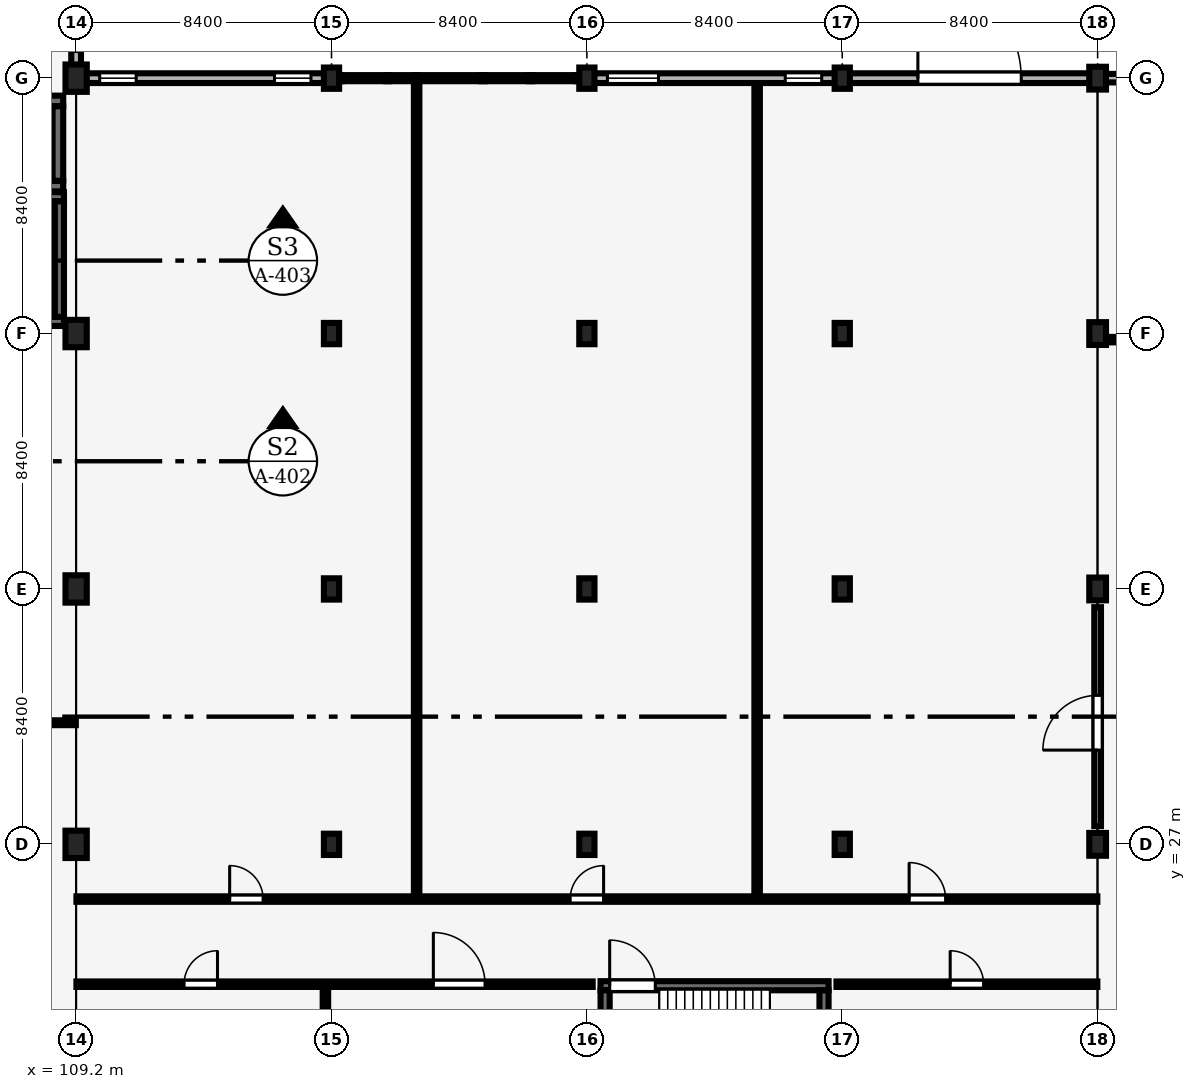
"""IFC4 building model, lengths in metres.
Left out: names, types, materials, properties, quantities, classifications, styles, units other than length and angle.
Written with IfcOpenShell. Run it as: python <this file> out.ifc"""

import sys

from ifc_helpers import new_model, si_unit, direction, frame, frame_2d, origin, origin_2d, place, context, subcontext, project, spatial, rectangle, extrude, element, fill, save


model = new_model("IFC4")
c1 = context("Model", 3, precision=1e-05, world=origin(), true_north=direction((0.0, 1.0)))
c2 = subcontext(c1, "Body", "Model", "MODEL_VIEW")
j1 = project(units=[si_unit("LENGTHUNIT", "METRE"), si_unit("PLANEANGLEUNIT", "RADIAN")], contexts=[c1])
p1 = place(None, origin())
s1 = spatial("IfcSite", under=j1, at=p1, CompositionType="ELEMENT")
p2 = place(p1, origin())
s2 = spatial("IfcBuilding", under=s1, at=p2, CompositionType="ELEMENT")
p3 = place(p2, origin())
s3 = spatial("IfcBuildingStorey", under=s2, at=p3, CompositionType="ELEMENT", Elevation=0.0)
for number, where, z_axis, x_axis in (
    (1, (109.2, 27.0, 0.0), (0.0, 0.0, 1.0), (1.0, 0.0, 0.0)),
    (2, (109.2, 35.4, 0.0), (0.0, 0.0, 1.0), (1.0, 0.0, 0.0)),
    (3, (109.2, 43.8, 0.0), (0.0, 0.0, 1.0), (1.0, 0.0, 0.0)),
    (4, (109.2, 52.2, 0.0), (0.0, 0.0, 1.0), (1.0, 0.0, 0.0)),
):
    element("IfcColumn", number, at=place(p3, frame(where, z_axis=z_axis, x_axis=x_axis)), inside=s3, PredefinedType="COLUMN", context=c2, shape_type="SweptSolid", body=[
        extrude(rectangle(XDim=0.7, YDim=0.9, at=origin_2d()), origin(), (0.0, 0.0, 1.0), 4.8),
    ])
for number, where, z_axis, x_axis in (
    (5, (117.6, 27.0, 0.0), (0.0, 0.0, 1.0), (1.0, 0.0, 0.0)),
    (6, (117.6, 35.4, 0.0), (0.0, 0.0, 1.0), (1.0, 0.0, 0.0)),
    (7, (117.6, 43.8, 0.0), (0.0, 0.0, 1.0), (1.0, 0.0, 0.0)),
    (8, (117.6, 52.2, 0.0), (0.0, 0.0, 1.0), (1.0, 0.0, 0.0)),
    (9, (126.0, 27.0, 0.0), (0.0, 0.0, 1.0), (1.0, 0.0, 0.0)),
    (10, (126.0, 35.4, 0.0), (0.0, 0.0, 1.0), (1.0, 0.0, 0.0)),
    (11, (126.0, 43.8, 0.0), (0.0, 0.0, 1.0), (1.0, 0.0, 0.0)),
    (12, (126.0, 52.2, 0.0), (0.0, 0.0, 1.0), (1.0, 0.0, 0.0)),
    (13, (134.4, 27.0, 0.0), (0.0, 0.0, 1.0), (1.0, 0.0, 0.0)),
    (14, (134.4, 35.4, 0.0), (0.0, 0.0, 1.0), (1.0, 0.0, 0.0)),
    (15, (134.4, 43.8, 0.0), (0.0, 0.0, 1.0), (1.0, 0.0, 0.0)),
    (16, (134.4, 52.2, 0.0), (0.0, 0.0, 1.0), (1.0, 0.0, 0.0)),
):
    element("IfcColumn", number, at=place(p3, frame(where, z_axis=z_axis, x_axis=x_axis)), inside=s3, PredefinedType="COLUMN", context=c2, shape_type="SweptSolid", body=[
        extrude(rectangle(XDim=0.5, YDim=0.7, at=origin_2d()), origin(), (0.0, 0.0, 1.0), 4.8),
    ])
for number, where, z_axis, x_axis in (
    (17, (142.8, 27.0, 0.0), (0.0, 0.0, 1.0), (1.0, 0.0, 0.0)),
    (18, (142.8, 35.4, 0.0), (0.0, 0.0, 1.0), (1.0, 0.0, 0.0)),
    (19, (142.8, 43.8, 0.0), (0.0, 0.0, 1.0), (1.0, 0.0, 0.0)),
    (20, (142.8, 52.2, 0.0), (0.0, 0.0, 1.0), (1.0, 0.0, 0.0)),
):
    element("IfcColumn", number, at=place(p3, frame(where, z_axis=z_axis, x_axis=x_axis)), inside=s3, PredefinedType="COLUMN", context=c2, shape_type="SweptSolid", body=[
        extrude(rectangle(XDim=0.55, YDim=0.75, at=origin_2d()), origin(), (0.0, 0.0, 1.0), 4.8),
    ])
p4 = place(p3, frame((143.05, 52.2, 0.0), z_axis=(0.0, 0.0, 1.0), x_axis=(1.0, 0.0, 0.0)))
e21 = element("IfcWall", 21, at=p4, inside=s3, PredefinedType="SOLIDWALL", context=c2, shape_type="SweptSolid", body=[
    extrude(rectangle(XDim=7.9, YDim=0.28, at=frame_2d((3.95, 0.0))), origin(), (0.0, 0.0, 1.0), 4.267),
])
p5 = place(p3, frame((109.525, 52.2, 0.0), z_axis=(0.0, 0.0, 1.0), x_axis=(1.0, 0.0, 0.0)))
e22 = element("IfcWall", 22, at=p5, inside=s3, PredefinedType="SOLIDWALL", context=c2, shape_type="SweptSolid", body=[
    extrude(rectangle(XDim=7.85, YDim=0.32, at=frame_2d((3.925, 0.0))), origin(), (0.0, 0.0, 1.0), 4.03),
])
p6 = place(p5, frame((0.45, 0.0, 0.9)))
e23 = element("IfcOpeningElement", 23, at=p6, cuts=e22, PredefinedType="OPENING", context=c2, shape_type="SweptSolid", body=[
    extrude(rectangle(XDim=1.2, YDim=1.5, at=frame_2d((0.6, 0.75))), frame((0.0, 0.17, 0.0), z_axis=(0.0, -1.0, 0.0), x_axis=(1.0, 0.0, 0.0)), (0.0, 0.0, 1.0), 0.34),
])
p7 = place(p5, frame((6.2, 0.0, 0.9)))
e24 = element("IfcOpeningElement", 24, at=p7, cuts=e22, PredefinedType="OPENING", context=c2, shape_type="SweptSolid", body=[
    extrude(rectangle(XDim=1.2, YDim=1.8, at=frame_2d((0.6, 0.9))), frame((0.0, 0.17, 0.0), z_axis=(0.0, -1.0, 0.0), x_axis=(1.0, 0.0, 0.0)), (0.0, 0.0, 1.0), 0.34),
])
p8 = place(p3, frame((126.225, 52.2, 0.0), z_axis=(0.0, 0.0, 1.0), x_axis=(1.0, 0.0, 0.0)))
e25 = element("IfcWall", 25, at=p8, inside=s3, PredefinedType="SOLIDWALL", context=c2, shape_type="SweptSolid", body=[
    extrude(rectangle(XDim=7.95, YDim=0.32, at=frame_2d((3.975, 0.0))), origin(), (0.0, 0.0, 1.0), 4.03),
])
p9 = place(p8, frame((0.45, 0.0, 0.9)))
e26 = element("IfcOpeningElement", 26, at=p9, cuts=e25, PredefinedType="OPENING", context=c2, shape_type="SweptSolid", body=[
    extrude(rectangle(XDim=1.68, YDim=2.4, at=frame_2d((0.84, 1.2))), frame((0.0, 0.17, 0.0), z_axis=(0.0, -1.0, 0.0), x_axis=(1.0, 0.0, 0.0)), (0.0, 0.0, 1.0), 0.34),
])
p10 = place(p8, frame((6.3, 0.0, 0.9)))
e27 = element("IfcOpeningElement", 27, at=p10, cuts=e25, PredefinedType="OPENING", context=c2, shape_type="SweptSolid", body=[
    extrude(rectangle(XDim=1.2, YDim=1.5, at=frame_2d((0.6, 0.75))), frame((0.0, 0.17, 0.0), z_axis=(0.0, -1.0, 0.0), x_axis=(1.0, 0.0, 0.0)), (0.0, 0.0, 1.0), 0.34),
])
p11 = place(p3, frame((134.625, 52.2, 0.0), z_axis=(0.0, 0.0, 1.0), x_axis=(1.0, 0.0, 0.0)))
e28 = element("IfcWall", 28, at=p11, inside=s3, PredefinedType="SOLIDWALL", context=c2, shape_type="SweptSolid", body=[
    extrude(rectangle(XDim=7.925, YDim=0.32, at=frame_2d((3.962, 0.0))), origin(), (0.0, 0.0, 1.0), 4.08),
])
p12 = place(p11, frame((2.262, 0.0, 0.0)))
e29 = element("IfcOpeningElement", 29, at=p12, cuts=e28, PredefinedType="OPENING", context=c2, shape_type="SweptSolid", body=[
    extrude(rectangle(XDim=3.4, YDim=3.2, at=frame_2d((1.7, 1.6))), frame((0.0, 0.17, 0.0), z_axis=(0.0, -1.0, 0.0), x_axis=(1.0, 0.0, 0.0)), (0.0, 0.0, 1.0), 0.34),
])
p13 = place(p3, frame((109.2, 52.625, 0.0), z_axis=(0.0, 0.0, 1.0), x_axis=(0.0, 1.0, 0.0)))
e30 = element("IfcWall", 30, at=p13, inside=s3, PredefinedType="SOLIDWALL", context=c2, shape_type="SweptSolid", body=[
    extrude(rectangle(XDim=7.55, YDim=0.32, at=frame_2d((3.775, 0.0))), origin(), (0.0, 0.0, 1.0), 3.89),
])
p14 = place(p13, frame((4.6, 0.0, 0.0), z_axis=(0.0, 0.0, 1.0), x_axis=(-1.0, 0.0, 0.0)))
e31 = element("IfcOpeningElement", 31, at=p14, cuts=e30, PredefinedType="OPENING", context=c2, shape_type="SweptSolid", body=[
    extrude(rectangle(XDim=1.65, YDim=2.25, at=frame_2d((0.825, 1.125))), frame((0.0, 0.17, 0.0), z_axis=(0.0, -1.0, 0.0), x_axis=(1.0, 0.0, 0.0)), (0.0, 0.0, 1.0), 0.34),
])
p15 = place(p13, frame((0.45, 0.0, 0.95)))
e32 = element("IfcOpeningElement", 32, at=p15, cuts=e30, PredefinedType="OPENING", context=c2, shape_type="SweptSolid", body=[
    extrude(rectangle(XDim=1.68, YDim=2.1, at=frame_2d((0.84, 1.05))), frame((0.0, 0.17, 0.0), z_axis=(0.0, -1.0, 0.0), x_axis=(1.0, 0.0, 0.0)), (0.0, 0.0, 1.0), 0.34),
])
for number, where, z_axis, x_axis in (
    (33, (101.2, 44.2, 0.0), (0.0, 0.0, 1.0), (1.0, 0.0, 0.0)),
    (34, (101.2, 48.3, 0.0), (0.0, 0.0, 1.0), (1.0, 0.0, 0.0)),
):
    element("IfcWall", number, at=place(p3, frame(where, z_axis=z_axis, x_axis=x_axis)), inside=s3, PredefinedType="SHEAR", context=c2, shape_type="SweptSolid", body=[
        extrude(rectangle(XDim=7.6, YDim=0.3, at=frame_2d((3.8, 0.0))), origin(), (0.0, 0.0, 1.0), 4.625),
    ])
p16 = place(p3, frame((108.65, 44.35, 0.0), z_axis=(0.0, 0.0, 1.0), x_axis=(0.0, 1.0, 0.0)))
e35 = element("IfcWall", 35, at=p16, inside=s3, PredefinedType="SHEAR", context=c2, shape_type="SweptSolid", body=[
    extrude(rectangle(XDim=3.8, YDim=0.3, at=frame_2d((1.9, 0.0))), origin(), (0.0, 0.0, 1.0), 4.625),
])
for number, where, z_axis, x_axis in (
    (36, (105.225, 48.65, 0.0), (0.0, 0.0, 1.0), (1.0, 0.0, 0.0)),
    (37, (105.225, 51.45, 0.0), (0.0, 0.0, 1.0), (1.0, 0.0, 0.0)),
):
    element("IfcWall", number, at=place(p3, frame(where, z_axis=z_axis, x_axis=x_axis)), inside=s3, PredefinedType="SHEAR", context=c2, shape_type="SweptSolid", body=[
        extrude(rectangle(XDim=3.55, YDim=0.35, at=frame_2d((1.775, 0.0))), origin(), (0.0, 0.0, 1.0), 4.52),
    ])
p17 = place(p3, frame((108.6, 48.825, 0.0), z_axis=(0.0, 0.0, 1.0), x_axis=(0.0, 1.0, 0.0)))
e38 = element("IfcWall", 38, at=p17, inside=s3, PredefinedType="SHEAR", context=c2, shape_type="SweptSolid", body=[
    extrude(rectangle(XDim=2.45, YDim=0.35, at=frame_2d((1.225, 0.0))), origin(), (0.0, 0.0, 1.0), 4.52),
])
p18 = place(p3, frame((126.45, 22.35, 0.0), z_axis=(0.0, 0.0, 1.0), x_axis=(1.0, 0.0, 0.0)))
e39 = element("IfcWall", 39, at=p18, inside=s3, PredefinedType="SHEAR", context=c2, shape_type="SweptSolid", body=[
    extrude(rectangle(XDim=7.5, YDim=0.3, at=frame_2d((3.75, 0.0))), origin(), (0.0, 0.0, 1.0), 4.625),
])
p19 = place(p18, frame((0.3, 0.0, 0.0)))
e40 = element("IfcOpeningElement", 40, at=p19, cuts=e39, PredefinedType="OPENING", context=c2, shape_type="SweptSolid", body=[
    extrude(rectangle(XDim=1.5, YDim=2.2, at=frame_2d((0.75, 1.1))), frame((0.0, 0.16, 0.0), z_axis=(0.0, -1.0, 0.0), x_axis=(1.0, 0.0, 0.0)), (0.0, 0.0, 1.0), 0.32),
])
for number, where, z_axis, x_axis in (
    (41, (126.6, 18.3, 0.0), (0.0, 0.0, 1.0), (0.0, 1.0, 0.0)),
    (42, (133.8, 18.3, 0.0), (0.0, 0.0, 1.0), (0.0, 1.0, 0.0)),
):
    element("IfcWall", number, at=place(p3, frame(where, z_axis=z_axis, x_axis=x_axis)), inside=s3, PredefinedType="SHEAR", context=c2, shape_type="SweptSolid", body=[
        extrude(rectangle(XDim=3.9, YDim=0.3, at=frame_2d((1.95, 0.0))), origin(), (0.0, 0.0, 1.0), 4.625),
    ])
p20 = place(p3, frame((101.105, 31.0, 0.0), z_axis=(0.0, 0.0, 1.0), x_axis=(1.0, 0.0, 0.0)))
e43 = element("IfcWall", 43, at=p20, inside=s3, PredefinedType="PARTITIONING", context=c2, shape_type="SweptSolid", body=[
    extrude(rectangle(XDim=8.085, YDim=0.16, at=frame_2d((4.042, 0.0))), origin(), (0.0, 0.0, 1.0), 4.5),
])
p21 = place(p3, frame((120.4, 25.295, 0.0), z_axis=(0.0, 0.0, 1.0), x_axis=(0.0, 1.0, 0.0)))
e44 = element("IfcWall", 44, at=p21, inside=s3, PredefinedType="PARTITIONING", context=c2, shape_type="SweptSolid", body=[
    extrude(rectangle(XDim=26.8, YDim=0.18, at=frame_2d((13.4, 0.0))), origin(), (0.0, 0.0, 1.0), 4.5),
])
p22 = place(p3, frame((131.6, 25.295, 0.0), z_axis=(0.0, 0.0, 1.0), x_axis=(0.0, 1.0, 0.0)))
e45 = element("IfcWall", 45, at=p22, inside=s3, PredefinedType="PARTITIONING", context=c2, shape_type="SweptSolid", body=[
    extrude(rectangle(XDim=26.74, YDim=0.18, at=frame_2d((13.37, 0.0))), origin(), (0.0, 0.0, 1.0), 4.5),
])
p23 = place(p3, frame((109.21, 25.2, 0.0), z_axis=(0.0, 0.0, 1.0), x_axis=(1.0, 0.0, 0.0)))
e46 = element("IfcWall", 46, at=p23, inside=s3, PredefinedType="PARTITIONING", context=c2, shape_type="SweptSolid", body=[
    extrude(rectangle(XDim=33.58, YDim=0.18, at=frame_2d((16.79, 0.0))), origin(), (0.0, 0.0, 1.0), 4.5),
])
p24 = place(p23, frame((5.04, 0.0, 0.0)))
e47 = element("IfcOpeningElement", 47, at=p24, cuts=e46, PredefinedType="OPENING", context=c2, shape_type="SweptSolid", body=[
    extrude(rectangle(XDim=1.1, YDim=2.3, at=frame_2d((0.55, 1.15))), frame((0.0, 0.1, 0.0), z_axis=(0.0, -1.0, 0.0), x_axis=(1.0, 0.0, 0.0)), (0.0, 0.0, 1.0), 0.2),
])
p25 = place(p23, frame((16.24, 0.0, 0.0)))
e48 = element("IfcOpeningElement", 48, at=p25, cuts=e46, PredefinedType="OPENING", context=c2, shape_type="SweptSolid", body=[
    extrude(rectangle(XDim=1.1, YDim=2.3, at=frame_2d((0.55, 1.15))), frame((0.0, 0.1, 0.0), z_axis=(0.0, -1.0, 0.0), x_axis=(1.0, 0.0, 0.0)), (0.0, 0.0, 1.0), 0.2),
])
p26 = place(p23, frame((27.39, 0.0, 0.0)))
e49 = element("IfcOpeningElement", 49, at=p26, cuts=e46, PredefinedType="OPENING", context=c2, shape_type="SweptSolid", body=[
    extrude(rectangle(XDim=1.2, YDim=2.4, at=frame_2d((0.6, 1.2))), frame((0.0, 0.1, 0.0), z_axis=(0.0, -1.0, 0.0), x_axis=(1.0, 0.0, 0.0)), (0.0, 0.0, 1.0), 0.2),
])
p27 = place(p3, frame((117.4, 18.105, 0.0), z_axis=(0.0, 0.0, 1.0), x_axis=(0.0, 1.0, 0.0)))
e50 = element("IfcWall", 50, at=p27, inside=s3, PredefinedType="PARTITIONING", context=c2, shape_type="SweptSolid", body=[
    extrude(rectangle(XDim=4.2, YDim=0.18, at=frame_2d((2.1, 0.0))), origin(), (0.0, 0.0, 1.0), 3.72),
])
p28 = place(p3, frame((109.21, 22.4, 0.0), z_axis=(0.0, 0.0, 1.0), x_axis=(1.0, 0.0, 0.0)))
e51 = element("IfcWall", 51, at=p28, inside=s3, PredefinedType="PARTITIONING", context=c2, shape_type="SweptSolid", body=[
    extrude(rectangle(XDim=16.98, YDim=0.18, at=frame_2d((8.49, 0.0))), origin(), (0.0, 0.0, 1.0), 4.5),
])
p29 = place(p28, frame((3.54, 0.0, 0.0)))
e52 = element("IfcOpeningElement", 52, at=p29, cuts=e51, PredefinedType="OPENING", context=c2, shape_type="SweptSolid", body=[
    extrude(rectangle(XDim=1.1, YDim=2.3, at=frame_2d((0.55, 1.15))), frame((0.0, 0.1, 0.0), z_axis=(0.0, -1.0, 0.0), x_axis=(1.0, 0.0, 0.0)), (0.0, 0.0, 1.0), 0.2),
])
p30 = place(p28, frame((11.74, 0.0, 0.0)))
e53 = element("IfcOpeningElement", 53, at=p30, cuts=e51, PredefinedType="OPENING", context=c2, shape_type="SweptSolid", body=[
    extrude(rectangle(XDim=1.7, YDim=2.25, at=frame_2d((0.85, 1.125))), frame((0.0, 0.1, 0.0), z_axis=(0.0, -1.0, 0.0), x_axis=(1.0, 0.0, 0.0)), (0.0, 0.0, 1.0), 0.2),
])
p31 = place(p3, frame((134.21, 22.4, 0.0), z_axis=(0.0, 0.0, 1.0), x_axis=(1.0, 0.0, 0.0)))
e54 = element("IfcWall", 54, at=p31, inside=s3, PredefinedType="PARTITIONING", context=c2, shape_type="SweptSolid", body=[
    extrude(rectangle(XDim=8.58, YDim=0.18, at=frame_2d((4.29, 0.0))), origin(), (0.0, 0.0, 1.0), 4.5),
])
p32 = place(p31, frame((3.74, 0.0, 0.0)))
e55 = element("IfcOpeningElement", 55, at=p32, cuts=e54, PredefinedType="OPENING", context=c2, shape_type="SweptSolid", body=[
    extrude(rectangle(XDim=1.1, YDim=2.3, at=frame_2d((0.55, 1.15))), frame((0.0, 0.1, 0.0), z_axis=(0.0, -1.0, 0.0), x_axis=(1.0, 0.0, 0.0)), (0.0, 0.0, 1.0), 0.2),
])
p33 = place(p3, frame((143.085, 43.6, 0.0), z_axis=(0.0, 0.0, 1.0), x_axis=(1.0, 0.0, 0.0)))
e56 = element("IfcWall", 56, at=p33, inside=s3, PredefinedType="PARTITIONING", context=c2, shape_type="SweptSolid", body=[
    extrude(rectangle(XDim=24.77, YDim=0.18, at=frame_2d((12.385, 0.0))), origin(), (0.0, 0.0, 1.0), 4.5),
])
p34 = place(p33, frame((9.915, 0.0, 0.0)))
e57 = element("IfcOpeningElement", 57, at=p34, cuts=e56, PredefinedType="OPENING", context=c2, shape_type="SweptSolid", body=[
    extrude(rectangle(XDim=1.8, YDim=2.4, at=frame_2d((0.9, 1.2))), frame((0.0, 0.1, 0.0), z_axis=(0.0, -1.0, 0.0), x_axis=(1.0, 0.0, 0.0)), (0.0, 0.0, 1.0), 0.2),
])
p35 = place(p3, frame((142.8, 27.6, 0.0), z_axis=(0.0, 0.0, 1.0), x_axis=(0.0, 1.0, 0.0)))
e58 = element("IfcWall", 58, at=p35, inside=s3, PredefinedType="SOLIDWALL", context=c2, shape_type="SweptSolid", body=[
    extrude(rectangle(XDim=7.2, YDim=0.22, at=frame_2d((3.6, 0.0))), origin(), (0.0, 0.0, 1.0), 3.72),
])
p36 = place(p35, frame((2.5, 0.0, 0.0)))
e59 = element("IfcOpeningElement", 59, at=p36, cuts=e58, PredefinedType="OPENING", context=c2, shape_type="SweptSolid", body=[
    extrude(rectangle(XDim=1.8, YDim=2.4, at=frame_2d((0.9, 1.2))), frame((0.0, 0.12, 0.0), z_axis=(0.0, -1.0, 0.0), x_axis=(1.0, 0.0, 0.0)), (0.0, 0.0, 1.0), 0.24),
])
p37 = place(p6, origin())
e60 = element("IfcWindow", 60, at=p37, inside=s3, PartitioningType="SINGLE_PANEL", PredefinedType="WINDOW", context=c2, shape_type="SweptSolid", body=[
    extrude(rectangle(XDim=1.2, YDim=1.5, at=frame_2d((0.6, 0.75))), frame((0.0, 0.03, 0.0), z_axis=(0.0, -1.0, 0.0), x_axis=(1.0, 0.0, 0.0)), (0.0, 0.0, 1.0), 0.06),
])
fill(e23, e60)
p38 = place(p7, origin())
e61 = element("IfcWindow", 61, at=p38, inside=s3, PartitioningType="SINGLE_PANEL", PredefinedType="WINDOW", context=c2, shape_type="SweptSolid", body=[
    extrude(rectangle(XDim=1.2, YDim=1.8, at=frame_2d((0.6, 0.9))), frame((0.0, 0.03, 0.0), z_axis=(0.0, -1.0, 0.0), x_axis=(1.0, 0.0, 0.0)), (0.0, 0.0, 1.0), 0.06),
])
fill(e24, e61)
p39 = place(p9, origin())
e62 = element("IfcWindow", 62, at=p39, inside=s3, PartitioningType="SINGLE_PANEL", PredefinedType="WINDOW", context=c2, shape_type="SweptSolid", body=[
    extrude(rectangle(XDim=1.68, YDim=2.4, at=frame_2d((0.84, 1.2))), frame((0.0, 0.03, 0.0), z_axis=(0.0, -1.0, 0.0), x_axis=(1.0, 0.0, 0.0)), (0.0, 0.0, 1.0), 0.06),
])
fill(e26, e62)
p40 = place(p10, origin())
e63 = element("IfcWindow", 63, at=p40, inside=s3, PartitioningType="SINGLE_PANEL", PredefinedType="WINDOW", context=c2, shape_type="SweptSolid", body=[
    extrude(rectangle(XDim=1.2, YDim=1.5, at=frame_2d((0.6, 0.75))), frame((0.0, 0.03, 0.0), z_axis=(0.0, -1.0, 0.0), x_axis=(1.0, 0.0, 0.0)), (0.0, 0.0, 1.0), 0.06),
])
fill(e27, e63)
p41 = place(p12, origin())
e64 = element("IfcDoor", 64, at=p41, inside=s3, OperationType="DOUBLE_DOOR_SINGLE_SWING", PredefinedType="DOOR", context=c2, shape_type="SweptSolid", body=[
    extrude(rectangle(XDim=3.4, YDim=3.2, at=frame_2d((1.7, 1.6))), frame((0.0, 0.025, 0.0), z_axis=(0.0, -1.0, 0.0), x_axis=(1.0, 0.0, 0.0)), (0.0, 0.0, 1.0), 0.05),
])
fill(e29, e64)
p42 = place(p19, origin())
e65 = element("IfcDoor", 65, at=p42, inside=s3, OperationType="DOUBLE_DOOR_SINGLE_SWING", PredefinedType="DOOR", context=c2, shape_type="SweptSolid", body=[
    extrude(rectangle(XDim=1.5, YDim=2.2, at=frame_2d((0.75, 1.1))), frame((0.0, 0.025, 0.0), z_axis=(0.0, -1.0, 0.0), x_axis=(1.0, 0.0, 0.0)), (0.0, 0.0, 1.0), 0.05),
])
fill(e40, e65)
p43 = place(p24, origin())
e66 = element("IfcDoor", 66, at=p43, inside=s3, OperationType="SINGLE_SWING_LEFT", PredefinedType="DOOR", context=c2, shape_type="SweptSolid", body=[
    extrude(rectangle(XDim=1.1, YDim=2.3, at=frame_2d((0.55, 1.15))), frame((0.0, 0.025, 0.0), z_axis=(0.0, -1.0, 0.0), x_axis=(1.0, 0.0, 0.0)), (0.0, 0.0, 1.0), 0.05),
])
fill(e47, e66)
p44 = place(p25, origin())
e67 = element("IfcDoor", 67, at=p44, inside=s3, OperationType="SINGLE_SWING_RIGHT", PredefinedType="DOOR", context=c2, shape_type="SweptSolid", body=[
    extrude(rectangle(XDim=1.1, YDim=2.3, at=frame_2d((0.55, 1.15))), frame((0.0, 0.025, 0.0), z_axis=(0.0, -1.0, 0.0), x_axis=(1.0, 0.0, 0.0)), (0.0, 0.0, 1.0), 0.05),
])
fill(e48, e67)
p45 = place(p26, origin())
e68 = element("IfcDoor", 68, at=p45, inside=s3, OperationType="SINGLE_SWING_LEFT", PredefinedType="DOOR", context=c2, shape_type="SweptSolid", body=[
    extrude(rectangle(XDim=1.2, YDim=2.4, at=frame_2d((0.6, 1.2))), frame((0.0, 0.025, 0.0), z_axis=(0.0, -1.0, 0.0), x_axis=(1.0, 0.0, 0.0)), (0.0, 0.0, 1.0), 0.05),
])
fill(e49, e68)
p46 = place(p29, origin())
e69 = element("IfcDoor", 69, at=p46, inside=s3, OperationType="SINGLE_SWING_RIGHT", PredefinedType="DOOR", context=c2, shape_type="SweptSolid", body=[
    extrude(rectangle(XDim=1.1, YDim=2.3, at=frame_2d((0.55, 1.15))), frame((0.0, 0.025, 0.0), z_axis=(0.0, -1.0, 0.0), x_axis=(1.0, 0.0, 0.0)), (0.0, 0.0, 1.0), 0.05),
])
fill(e52, e69)
p47 = place(p30, origin())
e70 = element("IfcDoor", 70, at=p47, inside=s3, OperationType="DOUBLE_DOOR_SINGLE_SWING", PredefinedType="DOOR", context=c2, shape_type="SweptSolid", body=[
    extrude(rectangle(XDim=1.7, YDim=2.25, at=frame_2d((0.85, 1.125))), frame((0.0, 0.025, 0.0), z_axis=(0.0, -1.0, 0.0), x_axis=(1.0, 0.0, 0.0)), (0.0, 0.0, 1.0), 0.05),
])
fill(e53, e70)
p48 = place(p32, origin())
e71 = element("IfcDoor", 71, at=p48, inside=s3, OperationType="SINGLE_SWING_LEFT", PredefinedType="DOOR", context=c2, shape_type="SweptSolid", body=[
    extrude(rectangle(XDim=1.1, YDim=2.3, at=frame_2d((0.55, 1.15))), frame((0.0, 0.025, 0.0), z_axis=(0.0, -1.0, 0.0), x_axis=(1.0, 0.0, 0.0)), (0.0, 0.0, 1.0), 0.05),
])
fill(e55, e71)
p49 = place(p36, origin())
e72 = element("IfcDoor", 72, at=p49, inside=s3, OperationType="DOUBLE_DOOR_SINGLE_SWING", PredefinedType="DOOR", context=c2, shape_type="SweptSolid", body=[
    extrude(rectangle(XDim=1.8, YDim=2.4, at=frame_2d((0.9, 1.2))), frame((0.0, 0.025, 0.0), z_axis=(0.0, -1.0, 0.0), x_axis=(1.0, 0.0, 0.0)), (0.0, 0.0, 1.0), 0.05),
])
fill(e59, e72)
save(model, sys.argv[1])
